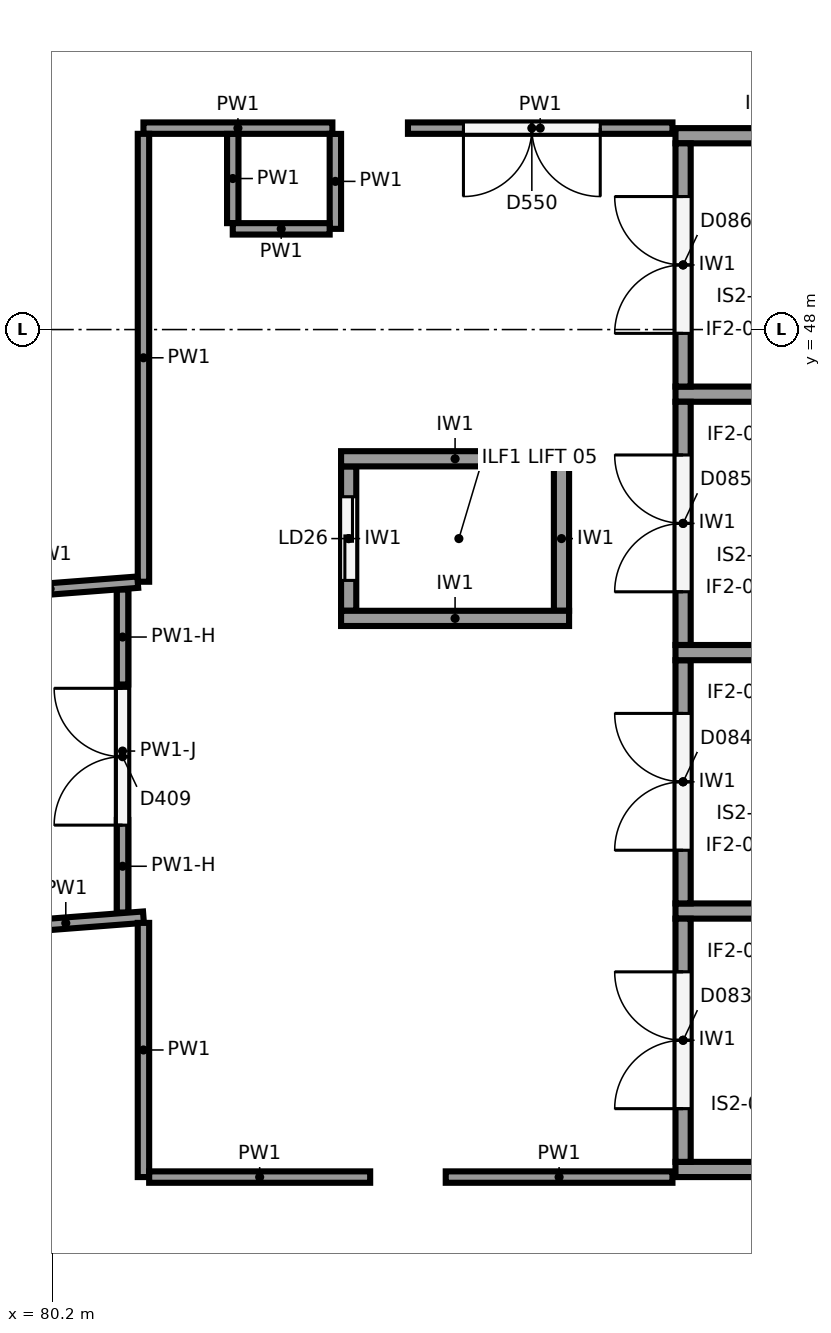
"""IFC4 building model, lengths in metres.
Left out: names, types, materials, properties, quantities, classifications, styles, units other than length and angle.
Written with IfcOpenShell. Run it as: python <this file> out.ifc"""

import sys

from ifc_helpers import new_model, si_unit, direction, frame, frame_2d, origin, origin_2d, place, context, subcontext, project, spatial, rectangle, circle, extrude, element, fill, save


model = new_model("IFC4")
c1 = context("Model", 3, precision=1e-05, world=origin(), true_north=direction((0.0, 1.0)))
c2 = subcontext(c1, "Body", "Model", "MODEL_VIEW")
j1 = project(units=[si_unit("LENGTHUNIT", "METRE"), si_unit("PLANEANGLEUNIT", "RADIAN")], contexts=[c1])
p1 = place(None, origin())
s1 = spatial("IfcSite", under=j1, at=p1, CompositionType="ELEMENT")
p2 = place(p1, origin())
s2 = spatial("IfcBuilding", under=s1, at=p2, CompositionType="ELEMENT")
p3 = place(p2, origin())
s3 = spatial("IfcBuildingStorey", under=s2, at=p3, CompositionType="ELEMENT", Elevation=0.0)
p4 = place(p3, frame((84.884, 42.562, 0.0), z_axis=(0.0, 0.0, 1.0), x_axis=(1.0, 0.0, 0.0)))
e1 = element("IfcColumn", 1, at=p4, inside=s3, PredefinedType="COLUMN", context=c2, shape_type="SweptSolid", body=[
    extrude(circle(Radius=0.6, at=origin_2d()), origin(), (0.0, 0.0, 1.0), 6.5),
])
for number, where, z_axis, x_axis in (
    (2, (97.2, 36.95, 0.0), (0.0, 0.0, 1.0), (-1.0, 0.0, 0.0)),
    (3, (97.2, 43.75, 0.0), (0.0, 0.0, 1.0), (-1.0, 0.0, 0.0)),
    (4, (97.2, 50.55, 0.0), (0.0, 0.0, 1.0), (-1.0, 0.0, 0.0)),
    (5, (97.2, 40.35, 0.0), (0.0, 0.0, 1.0), (-1.0, 0.0, 0.0)),
    (6, (97.2, 47.15, 0.0), (0.0, 0.0, 1.0), (-1.0, 0.0, 0.0)),
):
    element("IfcWall", number, at=place(p3, frame(where, z_axis=z_axis, x_axis=x_axis)), inside=s3, PredefinedType="SHEAR", context=c2, shape_type="SweptSolid", body=[
        extrude(rectangle(XDim=8.8, YDim=0.2, at=frame_2d((4.4, 0.0))), origin(), (0.0, 0.0, 1.0), 6.15),
    ])
p5 = place(p3, frame((88.5, 37.05, 0.0), z_axis=(0.0, 0.0, 1.0), x_axis=(0.0, 1.0, 0.0)))
e7 = element("IfcWall", 7, at=p5, inside=s3, PredefinedType="SHEAR", context=c2, shape_type="SweptSolid", body=[
    extrude(rectangle(XDim=3.2, YDim=0.2, at=frame_2d((1.6, 0.0))), origin(), (0.0, 0.0, 1.0), 6.15),
])
p6 = place(p5, frame((0.7, 0.0, 0.0)))
e8 = element("IfcOpeningElement", 8, at=p6, cuts=e7, PredefinedType="OPENING", context=c2, shape_type="SweptSolid", body=[
    extrude(rectangle(XDim=1.8, YDim=2.1, at=frame_2d((0.9, 1.05))), frame((0.0, 0.11, 0.0), z_axis=(0.0, -1.0, 0.0), x_axis=(1.0, 0.0, 0.0)), (0.0, 0.0, 1.0), 0.22),
])
p7 = place(p3, frame((88.5, 40.45, 0.0), z_axis=(0.0, 0.0, 1.0), x_axis=(0.0, 1.0, 0.0)))
e9 = element("IfcWall", 9, at=p7, inside=s3, PredefinedType="SHEAR", context=c2, shape_type="SweptSolid", body=[
    extrude(rectangle(XDim=3.2, YDim=0.2, at=frame_2d((1.6, 0.0))), origin(), (0.0, 0.0, 1.0), 6.15),
])
p8 = place(p7, frame((0.7, 0.0, 0.0)))
e10 = element("IfcOpeningElement", 10, at=p8, cuts=e9, PredefinedType="OPENING", context=c2, shape_type="SweptSolid", body=[
    extrude(rectangle(XDim=1.8, YDim=2.1, at=frame_2d((0.9, 1.05))), frame((0.0, 0.11, 0.0), z_axis=(0.0, -1.0, 0.0), x_axis=(1.0, 0.0, 0.0)), (0.0, 0.0, 1.0), 0.22),
])
p9 = place(p3, frame((88.5, 43.85, 0.0), z_axis=(0.0, 0.0, 1.0), x_axis=(0.0, 1.0, 0.0)))
e11 = element("IfcWall", 11, at=p9, inside=s3, PredefinedType="SHEAR", context=c2, shape_type="SweptSolid", body=[
    extrude(rectangle(XDim=3.2, YDim=0.2, at=frame_2d((1.6, 0.0))), origin(), (0.0, 0.0, 1.0), 6.15),
])
p10 = place(p9, frame((0.7, 0.0, 0.0)))
e12 = element("IfcOpeningElement", 12, at=p10, cuts=e11, PredefinedType="OPENING", context=c2, shape_type="SweptSolid", body=[
    extrude(rectangle(XDim=1.8, YDim=2.1, at=frame_2d((0.9, 1.05))), frame((0.0, 0.11, 0.0), z_axis=(0.0, -1.0, 0.0), x_axis=(1.0, 0.0, 0.0)), (0.0, 0.0, 1.0), 0.22),
])
p11 = place(p3, frame((88.5, 47.25, 0.0), z_axis=(0.0, 0.0, 1.0), x_axis=(0.0, 1.0, 0.0)))
e13 = element("IfcWall", 13, at=p11, inside=s3, PredefinedType="SHEAR", context=c2, shape_type="SweptSolid", body=[
    extrude(rectangle(XDim=3.2, YDim=0.2, at=frame_2d((1.6, 0.0))), origin(), (0.0, 0.0, 1.0), 6.15),
])
p12 = place(p11, frame((0.7, 0.0, 0.0)))
e14 = element("IfcOpeningElement", 14, at=p12, cuts=e13, PredefinedType="OPENING", context=c2, shape_type="SweptSolid", body=[
    extrude(rectangle(XDim=1.8, YDim=2.1, at=frame_2d((0.9, 1.05))), frame((0.0, 0.11, 0.0), z_axis=(0.0, -1.0, 0.0), x_axis=(1.0, 0.0, 0.0)), (0.0, 0.0, 1.0), 0.22),
])
for number, where, z_axis, x_axis in (
    (15, (87.0, 44.2, 0.0), (0.0, 0.0, 1.0), (-1.0, 0.0, 0.0)),
    (16, (87.0, 46.3, 0.0), (0.0, 0.0, 1.0), (-1.0, 0.0, 0.0)),
):
    element("IfcWall", number, at=place(p3, frame(where, z_axis=z_axis, x_axis=x_axis)), inside=s3, PredefinedType="SHEAR", context=c2, shape_type="SweptSolid", body=[
        extrude(rectangle(XDim=3.0, YDim=0.2, at=frame_2d((1.5, 0.0))), origin(), (0.0, 0.0, 1.0), 6.15),
    ])
p13 = place(p3, frame((86.9, 44.3, 0.0), z_axis=(0.0, 0.0, 1.0), x_axis=(0.0, 1.0, 0.0)))
e17 = element("IfcWall", 17, at=p13, inside=s3, PredefinedType="SHEAR", context=c2, shape_type="SweptSolid", body=[
    extrude(rectangle(XDim=1.9, YDim=0.2, at=frame_2d((0.95, 0.0))), origin(), (0.0, 0.0, 1.0), 6.15),
])
p14 = place(p3, frame((84.1, 44.3, 0.0), z_axis=(0.0, 0.0, 1.0), x_axis=(0.0, 1.0, 0.0)))
e18 = element("IfcWall", 18, at=p14, inside=s3, PredefinedType="SHEAR", context=c2, shape_type="SweptSolid", body=[
    extrude(rectangle(XDim=1.9, YDim=0.2, at=frame_2d((0.95, 0.0))), origin(), (0.0, 0.0, 1.0), 6.15),
])
p15 = place(p14, frame((0.4, 0.0, 0.0)))
e19 = element("IfcOpeningElement", 19, at=p15, cuts=e18, PredefinedType="OPENING", context=c2, shape_type="SweptSolid", body=[
    extrude(rectangle(XDim=1.1, YDim=2.1, at=frame_2d((0.55, 1.05))), frame((0.0, 0.11, 0.0), z_axis=(0.0, -1.0, 0.0), x_axis=(1.0, 0.0, 0.0)), (0.0, 0.0, 1.0), 0.22),
])
p16 = place(p3, frame((79.356, 40.113, 0.0), z_axis=(0.0, 0.0, 1.0), x_axis=(0.997072672084, 0.076459705623, 0.0)))
e20 = element("IfcWall", 20, at=p16, inside=s3, PredefinedType="PARTITIONING", context=c2, shape_type="SweptSolid", body=[
    extrude(rectangle(XDim=2.05, YDim=0.15, at=frame_2d((1.025, 0.0))), origin(), (0.0, 0.0, 1.0), 6.15),
])
p17 = place(p3, frame((81.4, 40.194, 0.0), z_axis=(0.0, 0.0, 1.0), x_axis=(0.0, -1.0, 0.0)))
e21 = element("IfcWall", 21, at=p17, inside=s3, PredefinedType="PARTITIONING", context=c2, shape_type="SweptSolid", body=[
    extrude(rectangle(XDim=3.344, YDim=0.15, at=frame_2d((1.672, 0.0))), origin(), (0.0, 0.0, 1.0), 6.15),
])
p18 = place(p3, frame((81.475, 36.85, 0.0), z_axis=(0.0, 0.0, 1.0), x_axis=(1.0, 0.0, 0.0)))
e22 = element("IfcWall", 22, at=p18, inside=s3, PredefinedType="PARTITIONING", context=c2, shape_type="SweptSolid", body=[
    extrude(rectangle(XDim=2.908, YDim=0.15, at=frame_2d((1.454, 0.0))), origin(), (0.0, 0.0, 1.0), 6.15),
])
p19 = place(p3, frame((85.377, 36.85, 0.0), z_axis=(0.0, 0.0, 1.0), x_axis=(1.0, 0.0, 0.0)))
e23 = element("IfcWall", 23, at=p19, inside=s3, PredefinedType="PARTITIONING", context=c2, shape_type="SweptSolid", body=[
    extrude(rectangle(XDim=2.983, YDim=0.15, at=frame_2d((1.491, 0.0))), origin(), (0.0, 0.0, 1.0), 6.15),
])
p20 = place(p3, frame((88.36, 50.65, 0.0), z_axis=(0.0, 0.0, 1.0), x_axis=(-1.0, 0.0, 0.0)))
e24 = element("IfcWall", 24, at=p20, inside=s3, PredefinedType="PARTITIONING", context=c2, shape_type="SweptSolid", body=[
    extrude(rectangle(XDim=3.48, YDim=0.15, at=frame_2d((1.74, 0.0))), origin(), (0.0, 0.0, 1.0), 6.15),
])
p21 = place(p20, frame((0.95, 0.0, 0.0)))
e25 = element("IfcOpeningElement", 25, at=p21, cuts=e24, PredefinedType="OPENING", context=c2, shape_type="SweptSolid", body=[
    extrude(rectangle(XDim=1.8, YDim=2.1, at=frame_2d((0.9, 1.05))), frame((0.0, 0.085, 0.0), z_axis=(0.0, -1.0, 0.0), x_axis=(1.0, 0.0, 0.0)), (0.0, 0.0, 1.0), 0.17),
])
p22 = place(p3, frame((83.886, 50.65, 0.0), z_axis=(0.0, 0.0, 1.0), x_axis=(-1.0, 0.0, 0.0)))
e26 = element("IfcWall", 26, at=p22, inside=s3, PredefinedType="PARTITIONING", context=c2, shape_type="SweptSolid", body=[
    extrude(rectangle(XDim=2.486, YDim=0.15, at=frame_2d((1.243, 0.0))), origin(), (0.0, 0.0, 1.0), 6.15),
])
p23 = place(p3, frame((81.4, 50.575, 0.0), z_axis=(0.0, 0.0, 1.0), x_axis=(0.0, -1.0, 0.0)))
e27 = element("IfcWall", 27, at=p23, inside=s3, PredefinedType="PARTITIONING", context=c2, shape_type="SweptSolid", body=[
    extrude(rectangle(XDim=5.893, YDim=0.15, at=frame_2d((2.946, 0.0))), origin(), (0.0, 0.0, 1.0), 6.15),
])
p24 = place(p3, frame((81.325, 44.677, 0.0), z_axis=(0.0, 0.0, 1.0), x_axis=(-0.997066273449, -0.076543101255, 0.0)))
e28 = element("IfcWall", 28, at=p24, inside=s3, PredefinedType="PARTITIONING", context=c2, shape_type="SweptSolid", body=[
    extrude(rectangle(XDim=2.312, YDim=0.15, at=frame_2d((1.156, 0.0))), origin(), (0.0, 0.0, 1.0), 6.15),
])
p25 = place(p3, frame((83.925, 49.325, 0.0), z_axis=(0.0, 0.0, 1.0), x_axis=(0.0, 1.0, 0.0)))
e29 = element("IfcWall", 29, at=p25, inside=s3, PredefinedType="PARTITIONING", context=c2, shape_type="SweptSolid", body=[
    extrude(rectangle(XDim=1.249, YDim=0.15, at=frame_2d((0.625, 0.0))), origin(), (0.0, 0.0, 1.0), 6.15),
])
p26 = place(p3, frame((82.575, 50.574, 0.0), z_axis=(0.0, 0.0, 1.0), x_axis=(0.0, -1.0, 0.0)))
e30 = element("IfcWall", 30, at=p26, inside=s3, PredefinedType="PARTITIONING", context=c2, shape_type="SweptSolid", body=[
    extrude(rectangle(XDim=1.174, YDim=0.15, at=frame_2d((0.587, 0.0))), origin(), (0.0, 0.0, 1.0), 6.15),
])
p27 = place(p3, frame((82.575, 49.325, 0.0), z_axis=(0.0, 0.0, 1.0), x_axis=(1.0, 0.0, 0.0)))
e31 = element("IfcWall", 31, at=p27, inside=s3, PredefinedType="PARTITIONING", context=c2, shape_type="SweptSolid", body=[
    extrude(rectangle(XDim=1.275, YDim=0.15, at=frame_2d((0.638, 0.0))), origin(), (0.0, 0.0, 1.0), 6.15),
])
p28 = place(p3, frame((81.125, 40.33, 0.0), z_axis=(0.0, 0.0, 1.0), x_axis=(0.0, 1.0, 0.0)))
e32 = element("IfcWall", 32, at=p28, inside=s3, PredefinedType="PARTITIONING", context=c2, shape_type="SweptSolid", body=[
    extrude(rectangle(XDim=4.249, YDim=0.15, at=frame_2d((2.125, 0.0))), origin(), (0.0, 0.0, 1.0), 5.05),
])
p29 = place(p28, frame((1.15, 0.0, 0.0)))
e33 = element("IfcOpeningElement", 33, at=p29, cuts=e32, PredefinedType="OPENING", context=c2, shape_type="SweptSolid", body=[
    extrude(rectangle(XDim=1.8, YDim=2.1, at=frame_2d((0.9, 1.05))), frame((0.0, 0.085, 0.0), z_axis=(0.0, -1.0, 0.0), x_axis=(1.0, 0.0, 0.0)), (0.0, 0.0, 1.0), 0.17),
])
p30 = place(p3, frame((81.125, 40.33, 5.05), z_axis=(0.0, 0.0, 1.0), x_axis=(0.0, 1.0, 0.0)))
e34 = element("IfcWall", 34, at=p30, inside=s3, PredefinedType="PARTITIONING", context=c2, shape_type="SweptSolid", body=[
    extrude(rectangle(XDim=1.218, YDim=0.15, at=frame_2d((0.609, 0.0))), origin(), (0.0, 0.0, 1.0), 1.1),
])
p31 = place(p3, frame((81.125, 43.33, 5.05), z_axis=(0.0, 0.0, 1.0), x_axis=(0.0, 1.0, 0.0)))
e35 = element("IfcWall", 35, at=p31, inside=s3, PredefinedType="PARTITIONING", context=c2, shape_type="SweptSolid", body=[
    extrude(rectangle(XDim=1.249, YDim=0.15, at=frame_2d((0.625, 0.0))), origin(), (0.0, 0.0, 1.0), 1.1),
])
p32 = place(p6, origin())
e36 = element("IfcDoor", 36, at=p32, inside=s3, OperationType="DOUBLE_DOOR_SINGLE_SWING", PredefinedType="DOOR", context=c2, shape_type="SweptSolid", body=[
    extrude(rectangle(XDim=1.8, YDim=2.1, at=frame_2d((0.9, 1.05))), frame((0.0, 0.025, 0.0), z_axis=(0.0, -1.0, 0.0), x_axis=(1.0, 0.0, 0.0)), (0.0, 0.0, 1.0), 0.05),
])
fill(e8, e36)
p33 = place(p8, origin())
e37 = element("IfcDoor", 37, at=p33, inside=s3, OperationType="DOUBLE_DOOR_SINGLE_SWING", PredefinedType="DOOR", context=c2, shape_type="SweptSolid", body=[
    extrude(rectangle(XDim=1.8, YDim=2.1, at=frame_2d((0.9, 1.05))), frame((0.0, 0.025, 0.0), z_axis=(0.0, -1.0, 0.0), x_axis=(1.0, 0.0, 0.0)), (0.0, 0.0, 1.0), 0.05),
])
fill(e10, e37)
p34 = place(p10, origin())
e38 = element("IfcDoor", 38, at=p34, inside=s3, OperationType="DOUBLE_DOOR_SINGLE_SWING", PredefinedType="DOOR", context=c2, shape_type="SweptSolid", body=[
    extrude(rectangle(XDim=1.8, YDim=2.1, at=frame_2d((0.9, 1.05))), frame((0.0, 0.025, 0.0), z_axis=(0.0, -1.0, 0.0), x_axis=(1.0, 0.0, 0.0)), (0.0, 0.0, 1.0), 0.05),
])
fill(e12, e38)
p35 = place(p12, origin())
e39 = element("IfcDoor", 39, at=p35, inside=s3, OperationType="DOUBLE_DOOR_SINGLE_SWING", PredefinedType="DOOR", context=c2, shape_type="SweptSolid", body=[
    extrude(rectangle(XDim=1.8, YDim=2.1, at=frame_2d((0.9, 1.05))), frame((0.0, 0.025, 0.0), z_axis=(0.0, -1.0, 0.0), x_axis=(1.0, 0.0, 0.0)), (0.0, 0.0, 1.0), 0.05),
])
fill(e14, e39)
p36 = place(p15, origin())
e40 = element("IfcDoor", 40, at=p36, inside=s3, OperationType="SLIDING_TO_RIGHT", PredefinedType="DOOR", context=c2, shape_type="SweptSolid", body=[
    extrude(rectangle(XDim=1.1, YDim=2.1, at=frame_2d((0.55, 1.05))), frame((0.0, 0.025, 0.0), z_axis=(0.0, -1.0, 0.0), x_axis=(1.0, 0.0, 0.0)), (0.0, 0.0, 1.0), 0.05),
])
fill(e19, e40)
p37 = place(p21, origin())
e41 = element("IfcDoor", 41, at=p37, inside=s3, OperationType="DOUBLE_DOOR_SINGLE_SWING", PredefinedType="DOOR", context=c2, shape_type="SweptSolid", body=[
    extrude(rectangle(XDim=1.8, YDim=2.1, at=frame_2d((0.9, 1.05))), frame((0.0, 0.025, 0.0), z_axis=(0.0, -1.0, 0.0), x_axis=(1.0, 0.0, 0.0)), (0.0, 0.0, 1.0), 0.05),
])
fill(e25, e41)
p38 = place(p29, origin())
e42 = element("IfcDoor", 42, at=p38, inside=s3, OperationType="DOUBLE_DOOR_SINGLE_SWING", PredefinedType="DOOR", context=c2, shape_type="SweptSolid", body=[
    extrude(rectangle(XDim=1.8, YDim=2.1, at=frame_2d((0.9, 1.05))), frame((0.0, 0.025, 0.0), z_axis=(0.0, -1.0, 0.0), x_axis=(1.0, 0.0, 0.0)), (0.0, 0.0, 1.0), 0.05),
])
fill(e33, e42)
save(model, sys.argv[1])
